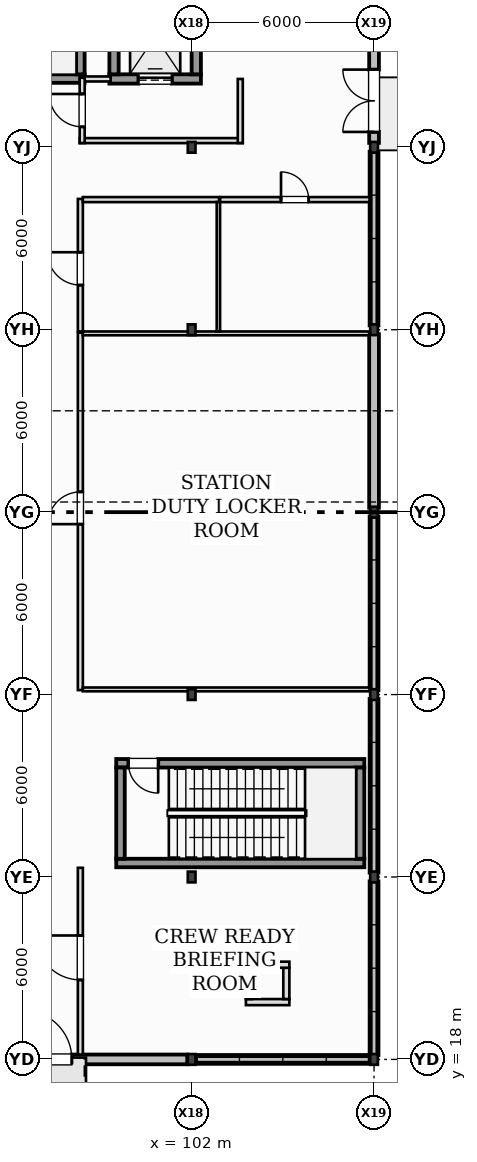
"""IFC4 building model, lengths in metres.
Left out: names, types, materials, properties, quantities, classifications, styles, units other than length and angle.
Written with IfcOpenShell. Run it as: python <this file> out.ifc"""

import sys

from ifc_helpers import new_model, si_unit, direction, frame, frame_2d, origin, origin_2d, place, context, subcontext, project, spatial, rectangle, i_section, extrude, element, fill, save


model = new_model("IFC4")
c1 = context("Model", 3, precision=1e-05, world=origin(), true_north=direction((0.0, 1.0)))
c2 = subcontext(c1, "Body", "Model", "MODEL_VIEW")
j1 = project(units=[si_unit("LENGTHUNIT", "METRE"), si_unit("PLANEANGLEUNIT", "RADIAN")], contexts=[c1])
p1 = place(None, origin())
s1 = spatial("IfcSite", under=j1, at=p1, CompositionType="ELEMENT")
p2 = place(p1, origin())
s2 = spatial("IfcBuilding", under=s1, at=p2, CompositionType="ELEMENT")
p3 = place(p2, origin())
s3 = spatial("IfcBuildingStorey", under=s2, at=p3, CompositionType="ELEMENT", Elevation=0.0)
for number, where, z_axis, x_axis in (
    (1, (102.0, 18.0, -0.41), (0.0, 0.0, 1.0), (1.0, 0.0, 0.0)),
    (2, (102.0, 24.0, -0.41), (0.0, 0.0, 1.0), (1.0, 0.0, 0.0)),
    (3, (102.0, 30.0, -0.41), (0.0, 0.0, 1.0), (1.0, 0.0, 0.0)),
    (4, (102.0, 36.0, -0.41), (0.0, 0.0, 1.0), (1.0, 0.0, 0.0)),
    (5, (102.0, 42.0, -0.41), (0.0, 0.0, 1.0), (1.0, 0.0, 0.0)),
    (6, (102.0, 48.0, -0.41), (0.0, 0.0, 1.0), (1.0, 0.0, 0.0)),
    (7, (108.0, 18.0, -0.41), (0.0, 0.0, 1.0), (1.0, 0.0, 0.0)),
    (8, (108.0, 24.0, -0.41), (0.0, 0.0, 1.0), (1.0, 0.0, 0.0)),
    (9, (108.0, 30.0, -0.41), (0.0, 0.0, 1.0), (1.0, 0.0, 0.0)),
    (10, (108.0, 36.0, -0.41), (0.0, 0.0, 1.0), (1.0, 0.0, 0.0)),
    (11, (108.0, 42.0, -0.41), (0.0, 0.0, 1.0), (1.0, 0.0, 0.0)),
    (12, (108.0, 48.0, -0.41), (0.0, 0.0, 1.0), (1.0, 0.0, 0.0)),
):
    element("IfcColumn", number, at=place(p3, frame(where, z_axis=z_axis, x_axis=x_axis)), inside=s3, PredefinedType="COLUMN", context=c2, shape_type="SweptSolid", body=[
        extrude(i_section(OverallWidth=0.254, OverallDepth=0.353, WebThickness=0.01, FlangeThickness=0.016, at=origin_2d()), origin(), (0.0, 0.0, 1.0), 6.41),
    ])
p4 = place(p3, frame((96.145, 18.0, 0.0), z_axis=(0.0, 0.0, 1.0), x_axis=(1.0, 0.0, 0.0)))
e13 = element("IfcWall", 13, at=p4, inside=s3, PredefinedType="STANDARD", context=c2, shape_type="SweptSolid", body=[
    extrude(rectangle(XDim=5.71, YDim=0.32, at=frame_2d((2.855, 0.0))), origin(), (0.0, 0.0, 1.0), 5.035),
])
p5 = place(p4, frame((0.295, 0.0, 0.0)))
e14 = element("IfcOpeningElement", 14, at=p5, cuts=e13, PredefinedType="OPENING", context=c2, shape_type="SweptSolid", body=[
    extrude(rectangle(XDim=1.62, YDim=2.2, at=frame_2d((0.81, 1.1))), frame((0.0, 0.17, 0.0), z_axis=(0.0, -1.0, 0.0), x_axis=(1.0, 0.0, 0.0)), (0.0, 0.0, 1.0), 0.34),
])
p6 = place(p3, frame((102.145, 18.0, 0.0), z_axis=(0.0, 0.0, 1.0), x_axis=(1.0, 0.0, 0.0)))
e15 = element("IfcWall", 15, at=p6, inside=s3, PredefinedType="STANDARD", context=c2, shape_type="SweptSolid", body=[
    extrude(rectangle(XDim=5.71, YDim=0.29, at=frame_2d((2.855, 0.0))), origin(), (0.0, 0.0, 1.0), 0.8),
])
p7 = place(p3, frame((108.0, 18.145, 0.0), z_axis=(0.0, 0.0, 1.0), x_axis=(0.0, 1.0, 0.0)))
e16 = element("IfcWall", 16, at=p7, inside=s3, PredefinedType="STANDARD", context=c2, shape_type="SweptSolid", body=[
    extrude(rectangle(XDim=5.71, YDim=0.29, at=frame_2d((2.855, 0.0))), origin(), (0.0, 0.0, 1.0), 0.44),
])
p8 = place(p3, frame((108.0, 24.145, 0.0), z_axis=(0.0, 0.0, 1.0), x_axis=(0.0, 1.0, 0.0)))
e17 = element("IfcWall", 17, at=p8, inside=s3, PredefinedType="STANDARD", context=c2, shape_type="SweptSolid", body=[
    extrude(rectangle(XDim=5.71, YDim=0.29, at=frame_2d((2.855, 0.0))), origin(), (0.0, 0.0, 1.0), 0.56),
])
p9 = place(p3, frame((108.0, 30.145, 0.0), z_axis=(0.0, 0.0, 1.0), x_axis=(0.0, 1.0, 0.0)))
e18 = element("IfcWall", 18, at=p9, inside=s3, PredefinedType="STANDARD", context=c2, shape_type="SweptSolid", body=[
    extrude(rectangle(XDim=5.71, YDim=0.29, at=frame_2d((2.855, 0.0))), origin(), (0.0, 0.0, 1.0), 0.68),
])
p10 = place(p3, frame((108.0, 36.145, 0.0), z_axis=(0.0, 0.0, 1.0), x_axis=(0.0, 1.0, 0.0)))
e19 = element("IfcWall", 19, at=p10, inside=s3, PredefinedType="STANDARD", context=c2, shape_type="SweptSolid", body=[
    extrude(rectangle(XDim=5.71, YDim=0.32, at=frame_2d((2.855, 0.0))), origin(), (0.0, 0.0, 1.0), 5.044),
])
p11 = place(p3, frame((108.0, 42.145, 0.0), z_axis=(0.0, 0.0, 1.0), x_axis=(0.0, 1.0, 0.0)))
e20 = element("IfcWall", 20, at=p11, inside=s3, PredefinedType="STANDARD", context=c2, shape_type="SweptSolid", body=[
    extrude(rectangle(XDim=5.71, YDim=0.29, at=frame_2d((2.855, 0.0))), origin(), (0.0, 0.0, 1.0), 0.8),
])
p12 = place(p3, frame((108.0, 48.145, 0.0), z_axis=(0.0, 0.0, 1.0), x_axis=(0.0, 1.0, 0.0)))
e21 = element("IfcWall", 21, at=p12, inside=s3, PredefinedType="STANDARD", context=c2, shape_type="SweptSolid", body=[
    extrude(rectangle(XDim=5.71, YDim=0.32, at=frame_2d((2.855, 0.0))), origin(), (0.0, 0.0, 1.0), 5.044),
])
p13 = place(p12, frame((0.36, 0.0, 0.0)))
e22 = element("IfcOpeningElement", 22, at=p13, cuts=e21, PredefinedType="OPENING", context=c2, shape_type="SweptSolid", body=[
    extrude(rectangle(XDim=2.05, YDim=2.45, at=frame_2d((1.025, 1.225))), frame((0.0, 0.17, 0.0), z_axis=(0.0, -1.0, 0.0), x_axis=(1.0, 0.0, 0.0)), (0.0, 0.0, 1.0), 0.34),
])
p14 = place(p3, frame((90.32, 50.26, 0.0), z_axis=(0.0, 0.0, 1.0), x_axis=(1.0, 0.0, 0.0)))
e23 = element("IfcWall", 23, at=p14, inside=s3, PredefinedType="SHEAR", context=c2, shape_type="SweptSolid", body=[
    extrude(rectangle(XDim=8.16, YDim=0.28, at=frame_2d((4.08, 0.0))), origin(), (0.0, 0.0, 1.0), 6.0),
])
p15 = place(p14, frame((0.65, 0.0, 0.0)))
e24 = element("IfcOpeningElement", 24, at=p15, cuts=e23, PredefinedType="OPENING", context=c2, shape_type="SweptSolid", body=[
    extrude(rectangle(XDim=0.98, YDim=2.15, at=frame_2d((0.49, 1.075))), frame((0.0, 0.15, 0.0), z_axis=(0.0, -1.0, 0.0), x_axis=(1.0, 0.0, 0.0)), (0.0, 0.0, 1.0), 0.3),
])
p16 = place(p3, frame((98.34, 50.4, 0.0), z_axis=(0.0, 0.0, 1.0), x_axis=(0.0, 1.0, 0.0)))
e25 = element("IfcWall", 25, at=p16, inside=s3, PredefinedType="SHEAR", context=c2, shape_type="SweptSolid", body=[
    extrude(rectangle(XDim=3.0, YDim=0.28, at=frame_2d((1.5, 0.0))), origin(), (0.0, 0.0, 1.0), 6.0),
])
p17 = place(p3, frame((99.52, 24.46, 0.0), z_axis=(0.0, 0.0, 1.0), x_axis=(1.0, 0.0, 0.0)))
e26 = element("IfcWall", 26, at=p17, inside=s3, PredefinedType="SHEAR", context=c2, shape_type="SweptSolid", body=[
    extrude(rectangle(XDim=8.16, YDim=0.28, at=frame_2d((4.08, 0.0))), origin(), (0.0, 0.0, 1.0), 6.0),
])
p18 = place(p3, frame((107.68, 27.74, 0.0), z_axis=(0.0, 0.0, 1.0), x_axis=(-1.0, 0.0, 0.0)))
e27 = element("IfcWall", 27, at=p18, inside=s3, PredefinedType="SHEAR", context=c2, shape_type="SweptSolid", body=[
    extrude(rectangle(XDim=8.16, YDim=0.28, at=frame_2d((4.08, 0.0))), origin(), (0.0, 0.0, 1.0), 6.0),
])
p19 = place(p18, frame((6.78, 0.0, 0.0)))
e28 = element("IfcOpeningElement", 28, at=p19, cuts=e27, PredefinedType="OPENING", context=c2, shape_type="SweptSolid", body=[
    extrude(rectangle(XDim=0.98, YDim=2.15, at=frame_2d((0.49, 1.075))), frame((0.0, 0.15, 0.0), z_axis=(0.0, -1.0, 0.0), x_axis=(1.0, 0.0, 0.0)), (0.0, 0.0, 1.0), 0.3),
])
for number, where, z_axis, x_axis in (
    (29, (99.66, 27.6, 0.0), (0.0, 0.0, 1.0), (0.0, -1.0, 0.0)),
    (30, (107.54, 24.6, 0.0), (0.0, 0.0, 1.0), (0.0, 1.0, 0.0)),
):
    element("IfcWall", number, at=place(p3, frame(where, z_axis=z_axis, x_axis=x_axis)), inside=s3, PredefinedType="SHEAR", context=c2, shape_type="SweptSolid", body=[
        extrude(rectangle(XDim=3.0, YDim=0.28, at=frame_2d((1.5, 0.0))), origin(), (0.0, 0.0, 1.0), 6.0),
    ])
p20 = place(p3, frame((99.295, 50.248, 0.0), z_axis=(0.0, 0.0, 1.0), x_axis=(1.0, 0.0, 0.0)))
e31 = element("IfcWall", 31, at=p20, inside=s3, PredefinedType="SHEAR", context=c2, shape_type="SweptSolid", body=[
    extrude(rectangle(XDim=3.01, YDim=0.305, at=frame_2d((1.505, 0.0))), origin(), (0.0, 0.0, 1.0), 6.0),
])
p21 = place(p20, frame((0.955, 0.0, 0.0)))
e32 = element("IfcOpeningElement", 32, at=p21, cuts=e31, PredefinedType="OPENING", context=c2, shape_type="SweptSolid", body=[
    extrude(rectangle(XDim=1.1, YDim=2.15, at=frame_2d((0.55, 1.075))), frame((0.0, 0.162, 0.0), z_axis=(0.0, -1.0, 0.0), x_axis=(1.0, 0.0, 0.0)), (0.0, 0.0, 1.0), 0.325),
])
for number, where, z_axis, x_axis in (
    (33, (99.448, 53.4, 0.0), (0.0, 0.0, 1.0), (0.0, -1.0, 0.0)),
    (34, (102.153, 50.4, 0.0), (0.0, 0.0, 1.0), (0.0, 1.0, 0.0)),
):
    element("IfcWall", number, at=place(p3, frame(where, z_axis=z_axis, x_axis=x_axis)), inside=s3, PredefinedType="SHEAR", context=c2, shape_type="SweptSolid", body=[
        extrude(rectangle(XDim=3.0, YDim=0.305, at=frame_2d((1.5, 0.0))), origin(), (0.0, 0.0, 1.0), 6.0),
    ])
p22 = place(p3, frame((98.32, 48.22, 0.0), z_axis=(0.0, 0.0, 1.0), x_axis=(1.0, 0.0, 0.0)))
e35 = element("IfcWall", 35, at=p22, inside=s3, PredefinedType="PARTITIONING", context=c2, shape_type="SweptSolid", body=[
    extrude(rectangle(XDim=5.36, YDim=0.165, at=frame_2d((2.68, 0.0))), origin(), (0.0, 0.0, 1.0), 5.035),
])
p23 = place(p3, frame((103.6, 48.14, 0.0), z_axis=(0.0, 0.0, 1.0), x_axis=(0.0, 1.0, 0.0)))
e36 = element("IfcWall", 36, at=p23, inside=s3, PredefinedType="PARTITIONING", context=c2, shape_type="SweptSolid", body=[
    extrude(rectangle(XDim=2.108, YDim=0.165, at=frame_2d((1.054, 0.0))), origin(), (0.0, 0.0, 1.0), 5.68),
])
p24 = place(p3, frame((98.32, 50.248, 0.0), z_axis=(0.0, 0.0, 1.0), x_axis=(1.0, 0.0, 0.0)))
e37 = element("IfcWall", 37, at=p24, inside=s3, PredefinedType="PARTITIONING", context=c2, shape_type="SweptSolid", body=[
    extrude(rectangle(XDim=1.015, YDim=0.165, at=frame_2d((0.507, 0.0))), origin(), (0.0, 0.0, 1.0), 5.68),
])
p25 = place(p3, frame((98.4, 48.14, 0.0), z_axis=(0.0, 0.0, 1.0), x_axis=(0.0, 1.0, 0.0)))
e38 = element("IfcWall", 38, at=p25, inside=s3, PredefinedType="PARTITIONING", context=c2, shape_type="SweptSolid", body=[
    extrude(rectangle(XDim=2.148, YDim=0.165, at=frame_2d((1.074, 0.0))), origin(), (0.0, 0.0, 1.0), 5.68),
])
p26 = place(p25, frame((0.534, 0.0, 0.0)))
e39 = element("IfcOpeningElement", 39, at=p26, cuts=e38, PredefinedType="OPENING", context=c2, shape_type="SweptSolid", body=[
    extrude(rectangle(XDim=1.08, YDim=2.14, at=frame_2d((0.54, 1.07))), frame((0.0, 0.093, 0.0), z_axis=(0.0, -1.0, 0.0), x_axis=(1.0, 0.0, 0.0)), (0.0, 0.0, 1.0), 0.185),
])
p27 = place(p3, frame((103.785, 19.885, 0.0), z_axis=(0.0, 0.0, 1.0), x_axis=(1.0, 0.0, 0.0)))
e40 = element("IfcWall", 40, at=p27, inside=s3, PredefinedType="PARTITIONING", context=c2, shape_type="SweptSolid", body=[
    extrude(rectangle(XDim=1.43, YDim=0.2, at=frame_2d((0.715, 0.0))), origin(), (0.0, 0.0, 1.0), 5.68),
])
p28 = place(p3, frame((105.115, 19.985, 0.0), z_axis=(0.0, 0.0, 1.0), x_axis=(0.0, 1.0, 0.0)))
e41 = element("IfcWall", 41, at=p28, inside=s3, PredefinedType="PARTITIONING", context=c2, shape_type="SweptSolid", body=[
    extrude(rectangle(XDim=1.03, YDim=0.2, at=frame_2d((0.515, 0.0))), origin(), (0.0, 0.0, 1.0), 5.68),
])
p29 = place(p3, frame((105.215, 21.115, 0.0), z_axis=(0.0, 0.0, 1.0), x_axis=(-1.0, 0.0, 0.0)))
e42 = element("IfcWall", 42, at=p29, inside=s3, PredefinedType="PARTITIONING", context=c2, shape_type="SweptSolid", body=[
    extrude(rectangle(XDim=1.43, YDim=0.2, at=frame_2d((0.715, 0.0))), origin(), (0.0, 0.0, 1.0), 5.68),
])
p30 = place(p3, frame((103.885, 21.015, 0.0), z_axis=(0.0, 0.0, 1.0), x_axis=(0.0, -1.0, 0.0)))
e43 = element("IfcWall", 43, at=p30, inside=s3, PredefinedType="PARTITIONING", context=c2, shape_type="SweptSolid", body=[
    extrude(rectangle(XDim=1.03, YDim=0.2, at=frame_2d((0.515, 0.0))), origin(), (0.0, 0.0, 1.0), 5.39),
])
p31 = place(p3, frame((98.34, 18.16, 0.0), z_axis=(0.0, 0.0, 1.0), x_axis=(0.0, 1.0, 0.0)))
e44 = element("IfcWall", 44, at=p31, inside=s3, PredefinedType="PARTITIONING", context=c2, shape_type="SweptSolid", body=[
    extrude(rectangle(XDim=6.143, YDim=0.165, at=frame_2d((3.071, 0.0))), origin(), (0.0, 0.0, 1.0), 5.294),
])
p32 = place(p31, frame((2.456, 0.0, 0.0)))
e45 = element("IfcOpeningElement", 45, at=p32, cuts=e44, PredefinedType="OPENING", context=c2, shape_type="SweptSolid", body=[
    extrude(rectangle(XDim=1.46, YDim=2.3, at=frame_2d((0.73, 1.15))), frame((0.0, 0.093, 0.0), z_axis=(0.0, -1.0, 0.0), x_axis=(1.0, 0.0, 0.0)), (0.0, 0.0, 1.0), 0.185),
])
p33 = place(p3, frame((98.34, 30.147, 0.0), z_axis=(0.0, 0.0, 1.0), x_axis=(0.0, 1.0, 0.0)))
e46 = element("IfcWall", 46, at=p33, inside=s3, PredefinedType="PARTITIONING", context=c2, shape_type="SweptSolid", body=[
    extrude(rectangle(XDim=11.755, YDim=0.165, at=frame_2d((5.877, 0.0))), origin(), (0.0, 0.0, 1.0), 5.294),
])
p34 = place(p33, frame((5.458, 0.0, 0.0)))
e47 = element("IfcOpeningElement", 47, at=p34, cuts=e46, PredefinedType="OPENING", context=c2, shape_type="SweptSolid", body=[
    extrude(rectangle(XDim=1.06, YDim=2.25, at=frame_2d((0.53, 1.125))), frame((0.0, 0.093, 0.0), z_axis=(0.0, -1.0, 0.0), x_axis=(1.0, 0.0, 0.0)), (0.0, 0.0, 1.0), 0.185),
])
p35 = place(p3, frame((98.42, 41.88, 0.0), z_axis=(0.0, 0.0, 1.0), x_axis=(1.0, 0.0, 0.0)))
e48 = element("IfcWall", 48, at=p35, inside=s3, PredefinedType="PARTITIONING", context=c2, shape_type="SweptSolid", body=[
    extrude(rectangle(XDim=9.42, YDim=0.125, at=frame_2d((4.71, 0.0))), origin(), (0.0, 0.0, 1.0), 5.035),
])
p36 = place(p3, frame((107.855, 30.17, 0.0), z_axis=(0.0, 0.0, 1.0), x_axis=(-1.0, 0.0, 0.0)))
e49 = element("IfcWall", 49, at=p36, inside=s3, PredefinedType="PARTITIONING", context=c2, shape_type="SweptSolid", body=[
    extrude(rectangle(XDim=9.435, YDim=0.125, at=frame_2d((4.718, 0.0))), origin(), (0.0, 0.0, 1.0), 5.035),
])
p37 = place(p3, frame((98.34, 41.942, 0.0), z_axis=(0.0, 0.0, 1.0), x_axis=(0.0, 1.0, 0.0)))
e50 = element("IfcWall", 50, at=p37, inside=s3, PredefinedType="PARTITIONING", context=c2, shape_type="SweptSolid", body=[
    extrude(rectangle(XDim=4.36, YDim=0.165, at=frame_2d((2.18, 0.0))), origin(), (0.0, 0.0, 1.0), 5.249),
])
p38 = place(p37, frame((1.526, 0.0, 0.0)))
e51 = element("IfcOpeningElement", 51, at=p38, cuts=e50, PredefinedType="OPENING", context=c2, shape_type="SweptSolid", body=[
    extrude(rectangle(XDim=1.08, YDim=2.14, at=frame_2d((0.54, 1.07))), frame((0.0, 0.093, 0.0), z_axis=(0.0, -1.0, 0.0), x_axis=(1.0, 0.0, 0.0)), (0.0, 0.0, 1.0), 0.185),
])
p39 = place(p3, frame((98.42, 46.28, 0.0), z_axis=(0.0, 0.0, 1.0), x_axis=(1.0, 0.0, 0.0)))
e52 = element("IfcWall", 52, at=p39, inside=s3, PredefinedType="PARTITIONING", context=c2, shape_type="SweptSolid", body=[
    extrude(rectangle(XDim=4.483, YDim=0.165, at=frame_2d((2.241, 0.0))), origin(), (0.0, 0.0, 1.0), 5.68),
])
p40 = place(p3, frame((102.88, 46.2, 0.0), z_axis=(0.0, 0.0, 1.0), x_axis=(0.0, -1.0, 0.0)))
e53 = element("IfcWall", 53, at=p40, inside=s3, PredefinedType="PARTITIONING", context=c2, shape_type="SweptSolid", body=[
    extrude(rectangle(XDim=4.258, YDim=0.11, at=frame_2d((2.129, 0.0))), origin(), (0.0, 0.0, 1.0), 5.68),
])
p41 = place(p3, frame((102.935, 46.28, 0.0), z_axis=(0.0, 0.0, 1.0), x_axis=(1.0, 0.0, 0.0)))
e54 = element("IfcWall", 54, at=p41, inside=s3, PredefinedType="PARTITIONING", context=c2, shape_type="SweptSolid", body=[
    extrude(rectangle(XDim=4.92, YDim=0.165, at=frame_2d((2.46, 0.0))), origin(), (0.0, 0.0, 1.0), 5.68),
])
p42 = place(p41, frame((2.005, 0.0, 0.0)))
e55 = element("IfcOpeningElement", 55, at=p42, cuts=e54, PredefinedType="OPENING", context=c2, shape_type="SweptSolid", body=[
    extrude(rectangle(XDim=0.91, YDim=2.1, at=frame_2d((0.455, 1.05))), frame((0.0, 0.093, 0.0), z_axis=(0.0, -1.0, 0.0), x_axis=(1.0, 0.0, 0.0)), (0.0, 0.0, 1.0), 0.185),
])
p43 = place(p5, frame((1.62, 0.0, 0.0), z_axis=(0.0, 0.0, 1.0), x_axis=(-1.0, 0.0, 0.0)))
e56 = element("IfcDoor", 56, at=p43, inside=s3, OperationType="SINGLE_SWING_LEFT", PredefinedType="DOOR", context=c2, shape_type="SweptSolid", body=[
    extrude(rectangle(XDim=1.62, YDim=2.2, at=frame_2d((0.81, 1.1))), frame((0.0, 0.025, 0.0), z_axis=(0.0, -1.0, 0.0), x_axis=(1.0, 0.0, 0.0)), (0.0, 0.0, 1.0), 0.05),
])
fill(e14, e56)
p44 = place(p13, frame((2.05, 0.0, 0.0), z_axis=(0.0, 0.0, 1.0), x_axis=(-1.0, 0.0, 0.0)))
e57 = element("IfcDoor", 57, at=p44, inside=s3, OperationType="DOUBLE_DOOR_SINGLE_SWING", PredefinedType="DOOR", context=c2, shape_type="SweptSolid", body=[
    extrude(rectangle(XDim=2.05, YDim=2.45, at=frame_2d((1.025, 1.225))), frame((0.0, 0.025, 0.0), z_axis=(0.0, -1.0, 0.0), x_axis=(1.0, 0.0, 0.0)), (0.0, 0.0, 1.0), 0.05),
])
fill(e22, e57)
p45 = place(p19, origin())
e58 = element("IfcDoor", 58, at=p45, inside=s3, OperationType="SINGLE_SWING_LEFT", PredefinedType="DOOR", context=c2, shape_type="SweptSolid", body=[
    extrude(rectangle(XDim=0.98, YDim=2.15, at=frame_2d((0.49, 1.075))), frame((0.0, 0.025, 0.0), z_axis=(0.0, -1.0, 0.0), x_axis=(1.0, 0.0, 0.0)), (0.0, 0.0, 1.0), 0.05),
])
fill(e28, e58)
p46 = place(p21, origin())
e59 = element("IfcDoor", 59, at=p46, inside=s3, OperationType="SLIDING_TO_LEFT", PredefinedType="DOOR", context=c2, shape_type="SweptSolid", body=[
    extrude(rectangle(XDim=1.1, YDim=2.15, at=frame_2d((0.55, 1.075))), frame((0.0, 0.025, 0.0), z_axis=(0.0, -1.0, 0.0), x_axis=(1.0, 0.0, 0.0)), (0.0, 0.0, 1.0), 0.05),
])
fill(e32, e59)
p47 = place(p26, frame((1.08, 0.0, 0.0), z_axis=(0.0, 0.0, 1.0), x_axis=(-1.0, 0.0, 0.0)))
e60 = element("IfcDoor", 60, at=p47, inside=s3, OperationType="SINGLE_SWING_RIGHT", PredefinedType="DOOR", context=c2, shape_type="SweptSolid", body=[
    extrude(rectangle(XDim=1.08, YDim=2.14, at=frame_2d((0.54, 1.07))), frame((0.0, 0.025, 0.0), z_axis=(0.0, -1.0, 0.0), x_axis=(1.0, 0.0, 0.0)), (0.0, 0.0, 1.0), 0.05),
])
fill(e39, e60)
p48 = place(p32, frame((1.46, 0.0, 0.0), z_axis=(0.0, 0.0, 1.0), x_axis=(-1.0, 0.0, 0.0)))
e61 = element("IfcDoor", 61, at=p48, inside=s3, OperationType="SINGLE_SWING_RIGHT", PredefinedType="DOOR", context=c2, shape_type="SweptSolid", body=[
    extrude(rectangle(XDim=1.46, YDim=2.3, at=frame_2d((0.73, 1.15))), frame((0.0, 0.025, 0.0), z_axis=(0.0, -1.0, 0.0), x_axis=(1.0, 0.0, 0.0)), (0.0, 0.0, 1.0), 0.05),
])
fill(e45, e61)
p49 = place(p34, frame((1.06, 0.0, 0.0), z_axis=(0.0, 0.0, 1.0), x_axis=(-1.0, 0.0, 0.0)))
e62 = element("IfcDoor", 62, at=p49, inside=s3, OperationType="SINGLE_SWING_LEFT", PredefinedType="DOOR", context=c2, shape_type="SweptSolid", body=[
    extrude(rectangle(XDim=1.06, YDim=2.25, at=frame_2d((0.53, 1.125))), frame((0.0, 0.025, 0.0), z_axis=(0.0, -1.0, 0.0), x_axis=(1.0, 0.0, 0.0)), (0.0, 0.0, 1.0), 0.05),
])
fill(e47, e62)
p50 = place(p38, frame((1.08, 0.0, 0.0), z_axis=(0.0, 0.0, 1.0), x_axis=(-1.0, 0.0, 0.0)))
e63 = element("IfcDoor", 63, at=p50, inside=s3, OperationType="SINGLE_SWING_RIGHT", PredefinedType="DOOR", context=c2, shape_type="SweptSolid", body=[
    extrude(rectangle(XDim=1.08, YDim=2.14, at=frame_2d((0.54, 1.07))), frame((0.0, 0.025, 0.0), z_axis=(0.0, -1.0, 0.0), x_axis=(1.0, 0.0, 0.0)), (0.0, 0.0, 1.0), 0.05),
])
fill(e51, e63)
p51 = place(p42, frame((0.91, 0.0, 0.0), z_axis=(0.0, 0.0, 1.0), x_axis=(-1.0, 0.0, 0.0)))
e64 = element("IfcDoor", 64, at=p51, inside=s3, OperationType="SINGLE_SWING_LEFT", PredefinedType="DOOR", context=c2, shape_type="SweptSolid", body=[
    extrude(rectangle(XDim=0.91, YDim=2.1, at=frame_2d((0.455, 1.05))), frame((0.0, 0.025, 0.0), z_axis=(0.0, -1.0, 0.0), x_axis=(1.0, 0.0, 0.0)), (0.0, 0.0, 1.0), 0.05),
])
fill(e55, e64)
save(model, sys.argv[1])
